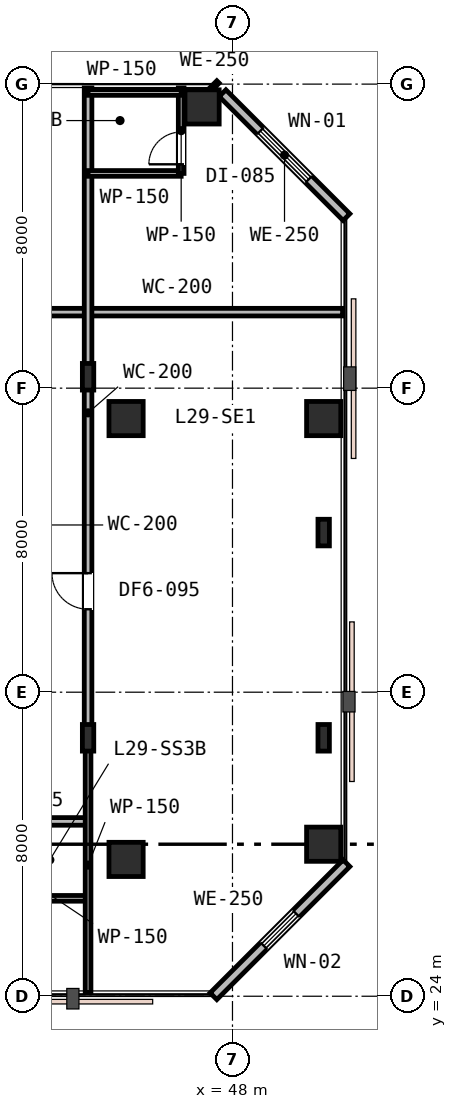
"""IFC4 building model, lengths in metres.
Left out: names, types, materials, properties, quantities, classifications, styles, units other than length and angle.
Written with IfcOpenShell. Run it as: python <this file> out.ifc"""

import sys

from ifc_helpers import new_model, si_unit, direction, frame, frame_2d, origin, origin_2d, place, context, subcontext, project, spatial, rectangle, i_section, extrude, element, fill, save


model = new_model("IFC4")
c1 = context("Model", 3, precision=1e-05, world=origin(), true_north=direction((0.0, 1.0)))
c2 = subcontext(c1, "Body", "Model", "MODEL_VIEW")
j1 = project(units=[si_unit("LENGTHUNIT", "METRE"), si_unit("PLANEANGLEUNIT", "RADIAN")], contexts=[c1])
p1 = place(None, origin())
s1 = spatial("IfcSite", under=j1, at=p1, CompositionType="ELEMENT")
p2 = place(p1, origin())
s2 = spatial("IfcBuilding", under=s1, at=p2, CompositionType="ELEMENT")
p3 = place(p2, frame((0.0, 0.0, 115.2)))
s3 = spatial("IfcBuildingStorey", under=s2, at=p3, CompositionType="ELEMENT", Elevation=115.2)
for number, where, z_axis, x_axis in (
    (1, (45.2, 27.6, 0.0), (0.0, 0.0, 1.0), (1.0, 0.0, 0.0)),
    (2, (45.2, 39.2, 0.0), (0.0, 0.0, 1.0), (1.0, 0.0, 0.0)),
    (3, (47.2, 47.4, 0.0), (0.0, 0.0, 1.0), (1.0, 0.0, 0.0)),
    (4, (50.4, 28.0, 0.0), (0.0, 0.0, 1.0), (1.0, 0.0, 0.0)),
    (5, (50.4, 39.2, 0.0), (0.0, 0.0, 1.0), (1.0, 0.0, 0.0)),
):
    element("IfcColumn", number, at=place(p3, frame(where, z_axis=z_axis, x_axis=x_axis)), inside=s3, PredefinedType="COLUMN", context=c2, shape_type="SweptSolid", body=[
        extrude(rectangle(XDim=0.9, YDim=0.9, at=origin_2d()), origin(), (0.0, 0.0, 1.0), 3.6),
    ])
for number, where, z_axis, x_axis in (
    (6, (44.2, 30.8, 0.0), (0.0, 0.0, 1.0), (1.0, 0.0, 0.0)),
    (7, (44.2, 40.3, 0.0), (0.0, 0.0, 1.0), (1.0, 0.0, 0.0)),
    (8, (50.4, 30.8, 0.0), (0.0, 0.0, 1.0), (1.0, 0.0, 0.0)),
    (9, (50.4, 36.2, 0.0), (0.0, 0.0, 1.0), (1.0, 0.0, 0.0)),
):
    element("IfcColumn", number, at=place(p3, frame(where, z_axis=z_axis, x_axis=x_axis)), inside=s3, PredefinedType="COLUMN", context=c2, shape_type="SweptSolid", body=[
        extrude(i_section(OverallWidth=0.3, OverallDepth=0.7, WebThickness=0.017, FlangeThickness=0.032, FilletRadius=0.027, at=origin_2d()), origin(), (0.0, 0.0, 1.0), 3.6),
    ])
p4 = place(p3, frame((47.5, 24.0, 0.0), z_axis=(0.0, 0.0, 1.0), x_axis=(0.707106781187, 0.707106781187, 0.0)))
e10 = element("IfcWall", 10, at=p4, inside=s3, PredefinedType="STANDARD", context=c2, shape_type="SweptSolid", body=[
    extrude(rectangle(XDim=4.95, YDim=0.25, at=frame_2d((2.475, 0.0))), origin(), (0.0, 0.0, 1.0), 3.33),
])
p5 = place(p4, frame((1.875, 0.0, 0.85)))
e11 = element("IfcOpeningElement", 11, at=p5, cuts=e10, PredefinedType="OPENING", context=c2, shape_type="SweptSolid", body=[
    extrude(rectangle(XDim=1.2, YDim=1.6, at=frame_2d((0.6, 0.8))), frame((0.0, 0.135, 0.0), z_axis=(0.0, -1.0, 0.0), x_axis=(1.0, 0.0, 0.0)), (0.0, 0.0, 1.0), 0.27),
])
p6 = place(p3, frame((51.0, 44.5, 0.0), z_axis=(0.0, 0.0, 1.0), x_axis=(-0.707106781187, 0.707106781187, 0.0)))
e12 = element("IfcWall", 12, at=p6, inside=s3, PredefinedType="STANDARD", context=c2, shape_type="SweptSolid", body=[
    extrude(rectangle(XDim=4.613, YDim=0.25, at=frame_2d((2.306, 0.0))), origin(), (0.0, 0.0, 1.0), 3.33),
])
p7 = place(p6, frame((1.406, 0.0, 0.75)))
e13 = element("IfcOpeningElement", 13, at=p7, cuts=e12, PredefinedType="OPENING", context=c2, shape_type="SweptSolid", body=[
    extrude(rectangle(XDim=1.8, YDim=1.85, at=frame_2d((0.9, 0.925))), frame((0.0, 0.135, 0.0), z_axis=(0.0, -1.0, 0.0), x_axis=(1.0, 0.0, 0.0)), (0.0, 0.0, 1.0), 0.27),
])
p8 = place(p3, frame((47.562, 47.938, 0.0), z_axis=(0.0, 0.0, 1.0), x_axis=(-0.707106781187, 0.707106781187, 0.0)))
e14 = element("IfcWall", 14, at=p8, inside=s3, PredefinedType="STANDARD", context=c2, shape_type="SweptSolid", body=[
    extrude(rectangle(XDim=0.087, YDim=0.25, at=frame_2d((0.044, 0.0))), origin(), (0.0, 0.0, 1.0), 3.33),
])
p9 = place(p3, frame((13.6, 28.6, 0.0), z_axis=(0.0, 0.0, 1.0), x_axis=(1.0, 0.0, 0.0)))
e15 = element("IfcWall", 15, at=p9, inside=s3, PredefinedType="PARTITIONING", context=c2, shape_type="SweptSolid", body=[
    extrude(rectangle(XDim=30.6, YDim=0.2, at=frame_2d((15.3, 0.0))), origin(), (0.0, 0.0, 1.0), 2.87),
])
p10 = place(p9, frame((13.325, 0.0, 0.0)))
e16 = element("IfcOpeningElement", 16, at=p10, cuts=e15, PredefinedType="OPENING", context=c2, shape_type="SweptSolid", body=[
    extrude(rectangle(XDim=0.95, YDim=2.15, at=frame_2d((0.475, 1.075))), frame((0.0, 0.11, 0.0), z_axis=(0.0, -1.0, 0.0), x_axis=(1.0, 0.0, 0.0)), (0.0, 0.0, 1.0), 0.22),
])
p11 = place(p9, frame((18.761, 0.0, 0.0)))
e17 = element("IfcOpeningElement", 17, at=p11, cuts=e15, PredefinedType="OPENING", context=c2, shape_type="SweptSolid", body=[
    extrude(rectangle(XDim=0.95, YDim=2.15, at=frame_2d((0.475, 1.075))), frame((0.0, 0.11, 0.0), z_axis=(0.0, -1.0, 0.0), x_axis=(1.0, 0.0, 0.0)), (0.0, 0.0, 1.0), 0.22),
])
p12 = place(p9, frame((25.503, 0.0, 0.0)))
e18 = element("IfcOpeningElement", 18, at=p12, cuts=e15, PredefinedType="OPENING", context=c2, shape_type="SweptSolid", body=[
    extrude(rectangle(XDim=0.95, YDim=2.15, at=frame_2d((0.475, 1.075))), frame((0.0, 0.11, 0.0), z_axis=(0.0, -1.0, 0.0), x_axis=(1.0, 0.0, 0.0)), (0.0, 0.0, 1.0), 0.22),
])
p13 = place(p3, frame((42.2, 42.0, 0.0), z_axis=(0.0, 0.0, 1.0), x_axis=(1.0, 0.0, 0.0)))
e19 = element("IfcWall", 19, at=p13, inside=s3, PredefinedType="PARTITIONING", context=c2, shape_type="SweptSolid", body=[
    extrude(rectangle(XDim=8.7, YDim=0.2, at=frame_2d((4.35, 0.0))), origin(), (0.0, 0.0, 1.0), 3.33),
])
p14 = place(p3, frame((41.824, 26.576, 0.0), z_axis=(0.0, 0.0, 1.0), x_axis=(1.0, 0.0, 0.0)))
e20 = element("IfcWall", 20, at=p14, inside=s3, PredefinedType="PARTITIONING", context=c2, shape_type="SweptSolid", body=[
    extrude(rectangle(XDim=2.376, YDim=0.15, at=frame_2d((1.188, 0.0))), origin(), (0.0, 0.0, 1.0), 3.33),
])
p15 = place(p3, frame((44.2, 30.8, 0.0), z_axis=(0.0, 0.0, 1.0), x_axis=(0.0, -1.0, 0.0)))
e21 = element("IfcWall", 21, at=p15, inside=s3, PredefinedType="PARTITIONING", context=c2, shape_type="SweptSolid", body=[
    extrude(rectangle(XDim=6.7, YDim=0.15, at=frame_2d((3.35, 0.0))), origin(), (0.0, 0.0, 1.0), 2.87),
])
p16 = place(p3, frame((44.2, 30.8, 0.0), z_axis=(0.0, 0.0, 1.0), x_axis=(0.0, 1.0, 0.0)))
e22 = element("IfcWall", 22, at=p16, inside=s3, PredefinedType="PARTITIONING", context=c2, shape_type="SweptSolid", body=[
    extrude(rectangle(XDim=17.1, YDim=0.2, at=frame_2d((8.55, 0.0))), origin(), (0.0, 0.0, 1.0), 2.87),
])
p17 = place(p16, frame((3.382, 0.0, 0.0)))
e23 = element("IfcOpeningElement", 23, at=p17, cuts=e22, PredefinedType="OPENING", context=c2, shape_type="SweptSolid", body=[
    extrude(rectangle(XDim=0.95, YDim=2.15, at=frame_2d((0.475, 1.075))), frame((0.0, 0.11, 0.0), z_axis=(0.0, -1.0, 0.0), x_axis=(1.0, 0.0, 0.0)), (0.0, 0.0, 1.0), 0.22),
])
p18 = place(p3, frame((44.2, 45.65, 0.0), z_axis=(0.0, 0.0, 1.0), x_axis=(1.0, 0.0, 0.0)))
e24 = element("IfcWall", 24, at=p18, inside=s3, PredefinedType="PARTITIONING", context=c2, shape_type="SweptSolid", body=[
    extrude(rectangle(XDim=2.45, YDim=0.15, at=frame_2d((1.225, 0.0))), origin(), (0.0, 0.0, 1.0), 3.33),
])
p19 = place(p3, frame((46.65, 45.65, 0.0), z_axis=(0.0, 0.0, 1.0), x_axis=(0.0, 1.0, 0.0)))
e25 = element("IfcWall", 25, at=p19, inside=s3, PredefinedType="PARTITIONING", context=c2, shape_type="SweptSolid", body=[
    extrude(rectangle(XDim=2.25, YDim=0.15, at=frame_2d((1.125, 0.0))), origin(), (0.0, 0.0, 1.0), 2.96),
])
p20 = place(p19, frame((0.24, 0.0, 0.0)))
e26 = element("IfcOpeningElement", 26, at=p20, cuts=e25, PredefinedType="OPENING", context=c2, shape_type="SweptSolid", body=[
    extrude(rectangle(XDim=0.85, YDim=2.15, at=frame_2d((0.425, 1.075))), frame((0.0, 0.085, 0.0), z_axis=(0.0, -1.0, 0.0), x_axis=(1.0, 0.0, 0.0)), (0.0, 0.0, 1.0), 0.17),
])
p21 = place(p3, frame((44.2, 47.78, 0.0), z_axis=(0.0, 0.0, 1.0), x_axis=(1.0, 0.0, 0.0)))
e27 = element("IfcWall", 27, at=p21, inside=s3, PredefinedType="PARTITIONING", context=c2, shape_type="SweptSolid", body=[
    extrude(rectangle(XDim=2.45, YDim=0.15, at=frame_2d((1.225, 0.0))), origin(), (0.0, 0.0, 1.0), 2.96),
])
p22 = place(p5, origin())
e28 = element("IfcWindow", 28, at=p22, inside=s3, PartitioningType="SINGLE_PANEL", PredefinedType="WINDOW", context=c2, shape_type="SweptSolid", body=[
    extrude(rectangle(XDim=1.2, YDim=1.6, at=frame_2d((0.6, 0.8))), frame((0.0, 0.03, 0.0), z_axis=(0.0, -1.0, 0.0), x_axis=(1.0, 0.0, 0.0)), (0.0, 0.0, 1.0), 0.06),
])
fill(e11, e28)
p23 = place(p7, origin())
e29 = element("IfcWindow", 29, at=p23, inside=s3, PartitioningType="SINGLE_PANEL", PredefinedType="WINDOW", context=c2, shape_type="SweptSolid", body=[
    extrude(rectangle(XDim=1.8, YDim=1.85, at=frame_2d((0.9, 0.925))), frame((0.0, 0.03, 0.0), z_axis=(0.0, -1.0, 0.0), x_axis=(1.0, 0.0, 0.0)), (0.0, 0.0, 1.0), 0.06),
])
fill(e13, e29)
p24 = place(p17, origin())
e30 = element("IfcDoor", 30, at=p24, inside=s3, OperationType="SINGLE_SWING_RIGHT", PredefinedType="DOOR", context=c2, shape_type="SweptSolid", body=[
    extrude(rectangle(XDim=0.95, YDim=2.15, at=frame_2d((0.475, 1.075))), frame((0.0, 0.025, 0.0), z_axis=(0.0, -1.0, 0.0), x_axis=(1.0, 0.0, 0.0)), (0.0, 0.0, 1.0), 0.05),
])
fill(e23, e30)
p25 = place(p20, origin())
e31 = element("IfcDoor", 31, at=p25, inside=s3, OperationType="SINGLE_SWING_LEFT", PredefinedType="DOOR", context=c2, shape_type="SweptSolid", body=[
    extrude(rectangle(XDim=0.85, YDim=2.15, at=frame_2d((0.425, 1.075))), frame((0.0, 0.025, 0.0), z_axis=(0.0, -1.0, 0.0), x_axis=(1.0, 0.0, 0.0)), (0.0, 0.0, 1.0), 0.05),
])
fill(e26, e31)
save(model, sys.argv[1])
